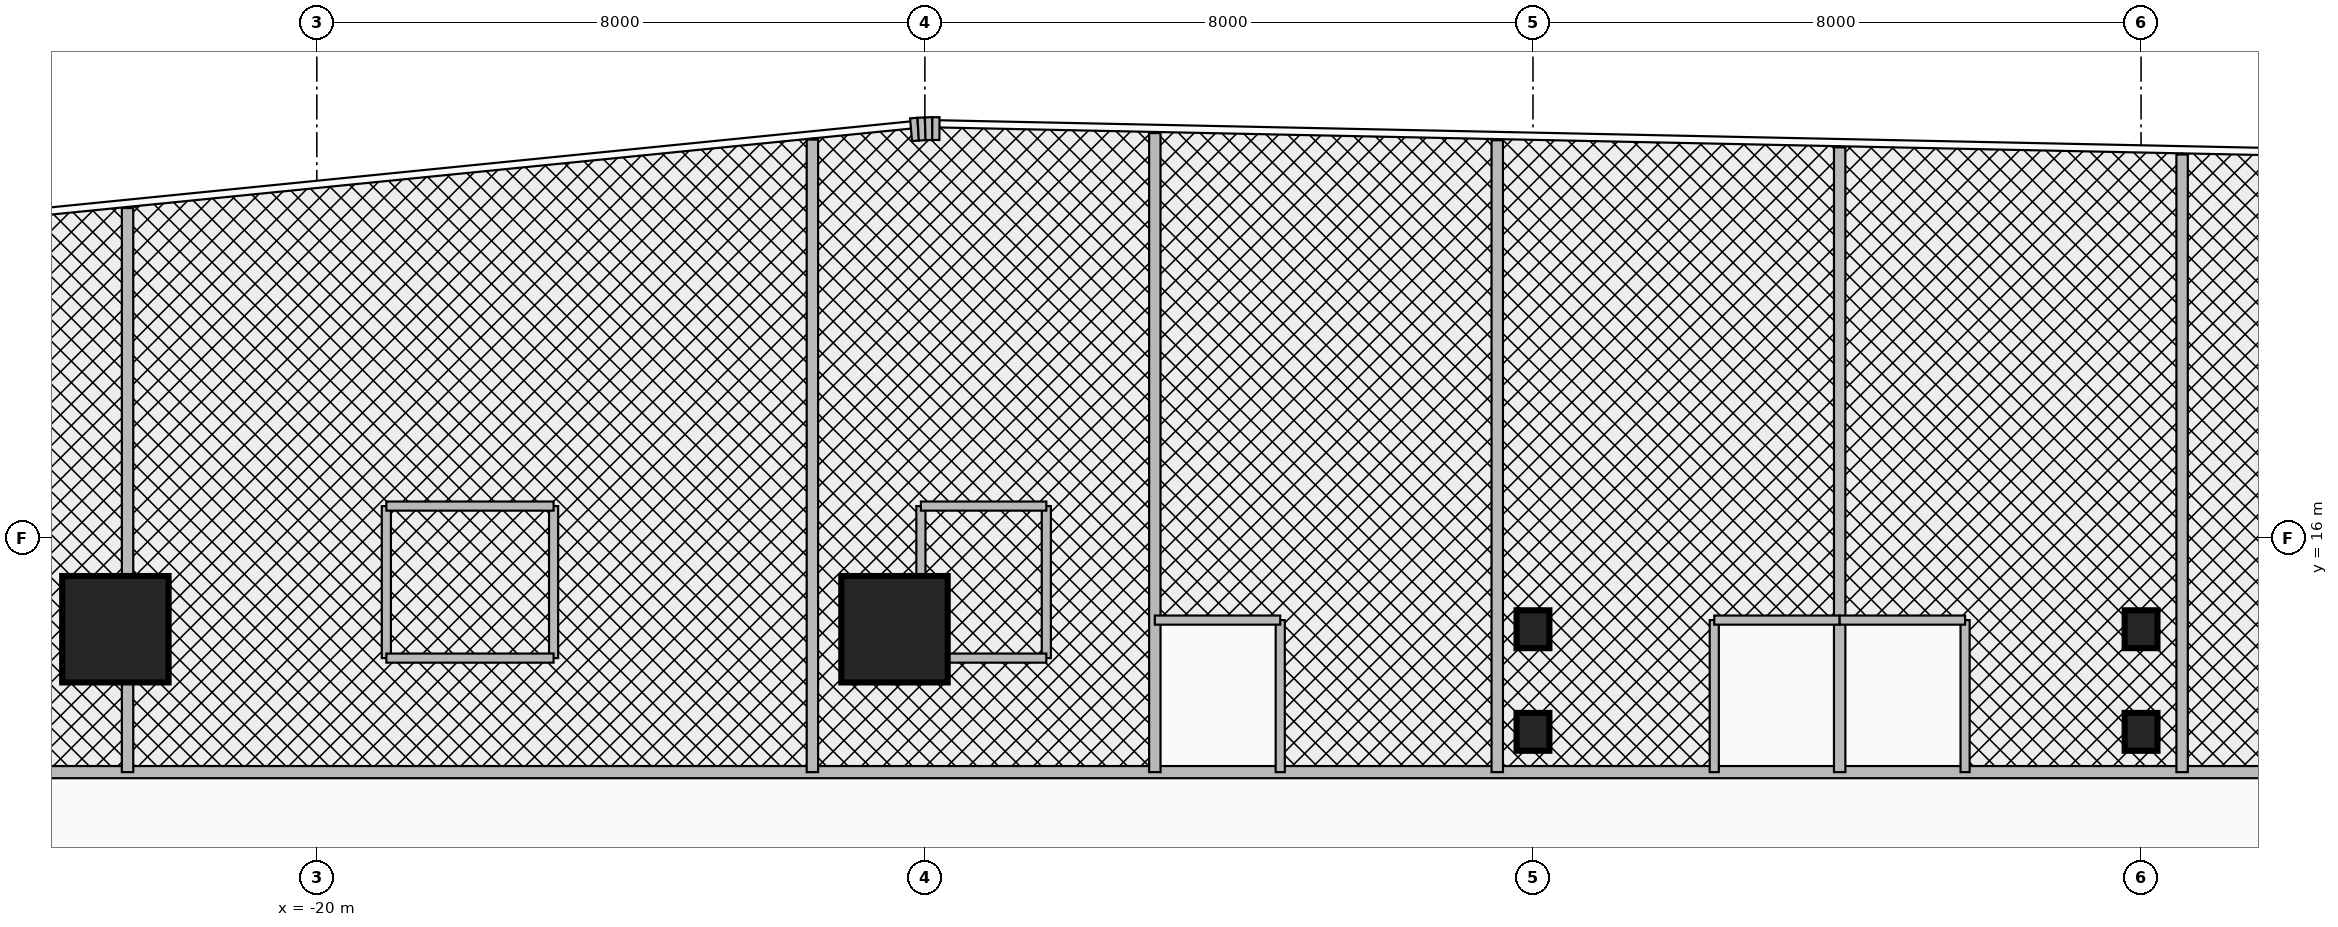
"""IFC4 building model, lengths in metres.
Left out: names, types, materials, properties, quantities, classifications, styles, units other than length and angle.
Written with IfcOpenShell. Run it as: python <this file> out.ifc"""

import sys

from ifc_helpers import new_model, si_unit, direction, frame, frame_2d, origin, origin_2d, place, context, subcontext, project, spatial, rectangle, i_section, extrude, source, transform, mapped, element, fill, save


model = new_model("IFC4")
c1 = context("Model", 3, precision=1e-05, world=origin(), true_north=direction((0.0, 1.0)))
c2 = subcontext(c1, "Body", "Model", "MODEL_VIEW")
j1 = project(units=[si_unit("LENGTHUNIT", "METRE"), si_unit("PLANEANGLEUNIT", "RADIAN")], contexts=[c1])
p1 = place(None, origin())
s1 = spatial("IfcSite", under=j1, at=p1, CompositionType="ELEMENT")
p2 = place(p1, origin())
s2 = spatial("IfcBuilding", under=s1, at=p2, CompositionType="ELEMENT")
p3 = place(p2, frame((0.0, 0.0, 26.0)))
s3 = spatial("IfcBuildingStorey", under=s2, at=p3, CompositionType="ELEMENT", Elevation=26.0)
m1 = source(origin(), c2, "Body", "SweptSolid", [
    extrude(rectangle(XDim=1.4, YDim=1.4, at=origin_2d()), origin(), (0.0, 0.0, 1.0), 3.7),
])
for number, where, z_axis, x_axis in (
    (1, (-22.65, 14.8, 0.0), (0.0, 0.0, 1.0), (1.0, 0.0, 0.0)),
    (2, (-12.4, 14.8, 0.0), (0.0, 0.0, 1.0), (1.0, 0.0, 0.0)),
):
    element("IfcColumn", number, at=place(p3, frame(where, z_axis=z_axis, x_axis=x_axis)), inside=s3, PredefinedType="COLUMN", context=c2, shape_type="MappedRepresentation", body=[
        mapped(m1, transform((0.0, 0.0, 0.0), x_axis=(1.0, 0.0, 0.0), y_axis=(0.0, 1.0, 0.0), z_axis=(0.0, 0.0, 1.0), scale=1.0)),
    ])
m2 = source(origin(), c2, "Body", "SweptSolid", [
    extrude(i_section(OverallWidth=0.432, OverallDepth=0.498, WebThickness=0.056, FlangeThickness=0.089, at=origin_2d()), origin(), (0.0, 0.0, 1.0), 3.7),
])
for number, where, z_axis, x_axis in (
    (3, (-4.0, 13.45, 0.0), (0.0, 0.0, 1.0), (1.0, 0.0, 0.0)),
    (4, (-4.0, 14.8, 0.0), (0.0, 0.0, 1.0), (1.0, 0.0, 0.0)),
    (5, (4.0, 13.45, 0.0), (0.0, 0.0, 1.0), (1.0, 0.0, 0.0)),
    (6, (4.0, 14.8, 0.0), (0.0, 0.0, 1.0), (1.0, 0.0, 0.0)),
):
    element("IfcColumn", number, at=place(p3, frame(where, z_axis=z_axis, x_axis=x_axis)), inside=s3, PredefinedType="COLUMN", context=c2, shape_type="MappedRepresentation", body=[
        mapped(m2, transform((0.0, 0.0, 0.0), x_axis=(1.0, 0.0, 0.0), y_axis=(0.0, 1.0, 0.0), z_axis=(0.0, 0.0, 1.0), scale=1.0)),
    ])
p4 = place(p3, frame((-12.182, 21.371, 0.0), z_axis=(0.0, 0.0, 1.0), x_axis=(0.996527790842, 0.08326080759, 0.0)))
e7 = element("IfcWall", 7, at=p4, inside=s3, PredefinedType="SOLIDWALL", context=c2, shape_type="SweptSolid", body=[
    extrude(rectangle(XDim=0.094, YDim=0.3, at=frame_2d((0.047, 0.0))), origin(), (0.0, 0.0, 1.0), 3.46),
])
p5 = place(p3, frame((-12.088, 21.379, 0.0), z_axis=(0.0, 0.0, 1.0), x_axis=(0.998476480444, 0.055178963393, 0.0)))
e8 = element("IfcWall", 8, at=p5, inside=s3, PredefinedType="SOLIDWALL", context=c2, shape_type="SweptSolid", body=[
    extrude(rectangle(XDim=0.093, YDim=0.3, at=frame_2d((0.046, 0.0))), origin(), (0.0, 0.0, 1.0), 3.46),
])
p6 = place(p3, frame((-11.996, 21.384, 0.0), z_axis=(0.0, 0.0, 1.0), x_axis=(0.999722573757, 0.023553673204, 0.0)))
e9 = element("IfcWall", 9, at=p6, inside=s3, PredefinedType="SOLIDWALL", context=c2, shape_type="SweptSolid", body=[
    extrude(rectangle(XDim=0.093, YDim=0.3, at=frame_2d((0.047, 0.0))), origin(), (0.0, 0.0, 1.0), 3.46),
])
p7 = place(p3, frame((-11.902, 21.386, 0.0), z_axis=(0.0, 0.0, 1.0), x_axis=(0.999986507273, -0.005194735103, 0.0)))
e10 = element("IfcWall", 10, at=p7, inside=s3, PredefinedType="SOLIDWALL", context=c2, shape_type="SweptSolid", body=[
    extrude(rectangle(XDim=0.094, YDim=0.3, at=frame_2d((0.047, 0.0))), origin(), (0.0, 0.0, 1.0), 3.46),
])
p8 = place(p3, frame((-31.89, 12.92, 0.0), z_axis=(0.0, 0.0, 1.0), x_axis=(1.0, 0.0, 0.0)))
e11 = element("IfcWall", 11, at=p8, inside=s3, PredefinedType="PARTITIONING", context=c2, shape_type="SweptSolid", body=[
    extrude(rectangle(XDim=45.44, YDim=0.16, at=frame_2d((22.72, 0.0))), origin(), (0.0, 0.0, 1.0), 2.583),
])
p9 = place(p8, frame((4.225, 0.0, 0.0)))
e12 = element("IfcOpeningElement", 12, at=p9, cuts=e11, PredefinedType="OPENING", context=c2, shape_type="SweptSolid", body=[
    extrude(rectangle(XDim=0.95, YDim=2.15, at=frame_2d((0.475, 1.075))), frame((0.0, 0.095, 0.0), z_axis=(0.0, -1.0, 0.0), x_axis=(1.0, 0.0, 0.0)), (0.0, 0.0, 1.0), 0.19),
])
p10 = place(p8, frame((13.43, 0.0, 0.0)))
e13 = element("IfcOpeningElement", 13, at=p10, cuts=e11, PredefinedType="OPENING", context=c2, shape_type="SweptSolid", body=[
    extrude(rectangle(XDim=0.95, YDim=2.15, at=frame_2d((0.475, 1.075))), frame((0.0, 0.095, 0.0), z_axis=(0.0, -1.0, 0.0), x_axis=(1.0, 0.0, 0.0)), (0.0, 0.0, 1.0), 0.19),
])
p11 = place(p8, frame((20.31, 0.0, 0.0)))
e14 = element("IfcOpeningElement", 14, at=p11, cuts=e11, PredefinedType="OPENING", context=c2, shape_type="SweptSolid", body=[
    extrude(rectangle(XDim=0.95, YDim=2.15, at=frame_2d((0.475, 1.075))), frame((0.0, 0.095, 0.0), z_axis=(0.0, -1.0, 0.0), x_axis=(1.0, 0.0, 0.0)), (0.0, 0.0, 1.0), 0.19),
])
p12 = place(p8, frame((25.517, 0.0, 0.0)))
e15 = element("IfcOpeningElement", 15, at=p12, cuts=e11, PredefinedType="OPENING", context=c2, shape_type="SweptSolid", body=[
    extrude(rectangle(XDim=0.95, YDim=2.15, at=frame_2d((0.475, 1.075))), frame((0.0, 0.095, 0.0), z_axis=(0.0, -1.0, 0.0), x_axis=(1.0, 0.0, 0.0)), (0.0, 0.0, 1.0), 0.19),
])
p13 = place(p8, frame((28.373, 0.0, 0.0)))
e16 = element("IfcOpeningElement", 16, at=p13, cuts=e11, PredefinedType="OPENING", context=c2, shape_type="SweptSolid", body=[
    extrude(rectangle(XDim=0.95, YDim=2.15, at=frame_2d((0.475, 1.075))), frame((0.0, 0.095, 0.0), z_axis=(0.0, -1.0, 0.0), x_axis=(1.0, 0.0, 0.0)), (0.0, 0.0, 1.0), 0.19),
])
p14 = place(p8, frame((34.527, 0.0, 0.0)))
e17 = element("IfcOpeningElement", 17, at=p14, cuts=e11, PredefinedType="OPENING", context=c2, shape_type="SweptSolid", body=[
    extrude(rectangle(XDim=0.95, YDim=2.15, at=frame_2d((0.475, 1.075))), frame((0.0, 0.095, 0.0), z_axis=(0.0, -1.0, 0.0), x_axis=(1.0, 0.0, 0.0)), (0.0, 0.0, 1.0), 0.19),
])
p15 = place(p8, frame((39.36, 0.0, 0.0)))
e18 = element("IfcOpeningElement", 18, at=p15, cuts=e11, PredefinedType="OPENING", context=c2, shape_type="SweptSolid", body=[
    extrude(rectangle(XDim=0.95, YDim=2.15, at=frame_2d((0.475, 1.075))), frame((0.0, 0.095, 0.0), z_axis=(0.0, -1.0, 0.0), x_axis=(1.0, 0.0, 0.0)), (0.0, 0.0, 1.0), 0.19),
])
p16 = place(p3, frame((-22.49, 12.92, 0.0), z_axis=(0.0, 0.0, 1.0), x_axis=(0.0, 1.0, 0.0)))
e19 = element("IfcWall", 19, at=p16, inside=s3, PredefinedType="PARTITIONING", context=c2, shape_type="SweptSolid", body=[
    extrude(rectangle(XDim=7.421, YDim=0.15, at=frame_2d((3.71, 0.0))), origin(), (0.0, 0.0, 1.0), 2.583),
])
p17 = place(p3, frame((-13.48, 12.92, 0.0), z_axis=(0.0, 0.0, 1.0), x_axis=(0.0, 1.0, 0.0)))
e20 = element("IfcWall", 20, at=p17, inside=s3, PredefinedType="PARTITIONING", context=c2, shape_type="SweptSolid", body=[
    extrude(rectangle(XDim=8.322, YDim=0.15, at=frame_2d((4.161, 0.0))), origin(), (0.0, 0.0, 1.0), 2.583),
])
p18 = place(p3, frame((-4.47, 12.92, 0.0), z_axis=(0.0, 0.0, 1.0), x_axis=(0.0, 1.0, 0.0)))
e21 = element("IfcWall", 21, at=p18, inside=s3, PredefinedType="PARTITIONING", context=c2, shape_type="SweptSolid", body=[
    extrude(rectangle(XDim=8.313, YDim=0.15, at=frame_2d((4.157, 0.0))), origin(), (0.0, 0.0, 1.0), 2.583),
])
p19 = place(p3, frame((4.54, 12.92, 0.0), z_axis=(0.0, 0.0, 1.0), x_axis=(0.0, 1.0, 0.0)))
e22 = element("IfcWall", 22, at=p19, inside=s3, PredefinedType="PARTITIONING", context=c2, shape_type="SweptSolid", body=[
    extrude(rectangle(XDim=8.125, YDim=0.15, at=frame_2d((4.063, 0.0))), origin(), (0.0, 0.0, 1.0), 2.583),
])
for number, where, z_axis, x_axis in (
    (23, (-19.085, 14.42, 0.0), (0.0, 0.0, 1.0), (0.0, 1.0, 0.0)),
    (24, (-16.885, 14.42, 0.0), (0.0, 0.0, 1.0), (0.0, 1.0, 0.0)),
):
    element("IfcWall", number, at=place(p3, frame(where, z_axis=z_axis, x_axis=x_axis)), inside=s3, PredefinedType="PARTITIONING", context=c2, shape_type="SweptSolid", body=[
        extrude(rectangle(XDim=2.0, YDim=0.12, at=frame_2d((1.0, 0.0))), origin(), (0.0, 0.0, 1.0), 2.583),
    ])
p20 = place(p3, frame((-19.085, 16.42, 0.0), z_axis=(0.0, 0.0, 1.0), x_axis=(1.0, 0.0, 0.0)))
e25 = element("IfcWall", 25, at=p20, inside=s3, PredefinedType="PARTITIONING", context=c2, shape_type="SweptSolid", body=[
    extrude(rectangle(XDim=2.2, YDim=0.12, at=frame_2d((1.1, 0.0))), origin(), (0.0, 0.0, 1.0), 3.46),
])
p21 = place(p3, frame((-19.085, 14.42, 0.0), z_axis=(0.0, 0.0, 1.0), x_axis=(1.0, 0.0, 0.0)))
e26 = element("IfcWall", 26, at=p21, inside=s3, PredefinedType="PARTITIONING", context=c2, shape_type="SweptSolid", body=[
    extrude(rectangle(XDim=2.2, YDim=0.12, at=frame_2d((1.1, 0.0))), origin(), (0.0, 0.0, 1.0), 3.46),
])
p22 = place(p21, frame((0.675, 0.0, 0.0)))
e27 = element("IfcOpeningElement", 27, at=p22, cuts=e26, PredefinedType="OPENING", context=c2, shape_type="SweptSolid", body=[
    extrude(rectangle(XDim=0.85, YDim=2.1, at=frame_2d((0.425, 1.05))), frame((0.0, 0.075, 0.0), z_axis=(0.0, -1.0, 0.0), x_axis=(1.0, 0.0, 0.0)), (0.0, 0.0, 1.0), 0.15),
])
p23 = place(p3, frame((-8.975, 12.92, 0.0), z_axis=(0.0, 0.0, 1.0), x_axis=(0.0, 1.0, 0.0)))
e28 = element("IfcWall", 28, at=p23, inside=s3, PredefinedType="PARTITIONING", context=c2, shape_type="SweptSolid", body=[
    extrude(rectangle(XDim=8.407, YDim=0.15, at=frame_2d((4.204, 0.0))), origin(), (0.0, 0.0, 1.0), 2.583),
])
for number, where, z_axis, x_axis in (
    (29, (-12.052, 14.42, 0.0), (0.0, 0.0, 1.0), (0.0, 1.0, 0.0)),
    (30, (-10.403, 14.42, 0.0), (0.0, 0.0, 1.0), (0.0, 1.0, 0.0)),
):
    element("IfcWall", number, at=place(p3, frame(where, z_axis=z_axis, x_axis=x_axis)), inside=s3, PredefinedType="PARTITIONING", context=c2, shape_type="SweptSolid", body=[
        extrude(rectangle(XDim=2.0, YDim=0.12, at=frame_2d((1.0, 0.0))), origin(), (0.0, 0.0, 1.0), 2.583),
    ])
p24 = place(p3, frame((-12.052, 16.42, 0.0), z_axis=(0.0, 0.0, 1.0), x_axis=(1.0, 0.0, 0.0)))
e31 = element("IfcWall", 31, at=p24, inside=s3, PredefinedType="PARTITIONING", context=c2, shape_type="SweptSolid", body=[
    extrude(rectangle(XDim=1.65, YDim=0.12, at=frame_2d((0.825, 0.0))), origin(), (0.0, 0.0, 1.0), 3.46),
])
p25 = place(p3, frame((-12.052, 14.42, 0.0), z_axis=(0.0, 0.0, 1.0), x_axis=(1.0, 0.0, 0.0)))
e32 = element("IfcWall", 32, at=p25, inside=s3, PredefinedType="PARTITIONING", context=c2, shape_type="SweptSolid", body=[
    extrude(rectangle(XDim=1.65, YDim=0.12, at=frame_2d((0.825, 0.0))), origin(), (0.0, 0.0, 1.0), 3.46),
])
p26 = place(p25, frame((0.46, 0.0, 0.0)))
e33 = element("IfcOpeningElement", 33, at=p26, cuts=e32, PredefinedType="OPENING", context=c2, shape_type="SweptSolid", body=[
    extrude(rectangle(XDim=0.85, YDim=2.1, at=frame_2d((0.425, 1.05))), frame((0.0, 0.075, 0.0), z_axis=(0.0, -1.0, 0.0), x_axis=(1.0, 0.0, 0.0)), (0.0, 0.0, 1.0), 0.15),
])
p27 = place(p3, frame((-7.325, 12.92, 0.0), z_axis=(0.0, 0.0, 1.0), x_axis=(0.0, 1.0, 0.0)))
e34 = element("IfcWall", 34, at=p27, inside=s3, PredefinedType="PARTITIONING", context=c2, shape_type="SweptSolid", body=[
    extrude(rectangle(XDim=2.0, YDim=0.12, at=frame_2d((1.0, 0.0))), origin(), (0.0, 0.0, 1.0), 2.583),
])
p28 = place(p3, frame((-8.975, 14.92, 0.0), z_axis=(0.0, 0.0, 1.0), x_axis=(1.0, 0.0, 0.0)))
e35 = element("IfcWall", 35, at=p28, inside=s3, PredefinedType="PARTITIONING", context=c2, shape_type="SweptSolid", body=[
    extrude(rectangle(XDim=1.65, YDim=0.12, at=frame_2d((0.825, 0.0))), origin(), (0.0, 0.0, 1.0), 2.583),
])
p29 = place(p28, frame((0.4, 0.0, 0.0)))
e36 = element("IfcOpeningElement", 36, at=p29, cuts=e35, PredefinedType="OPENING", context=c2, shape_type="SweptSolid", body=[
    extrude(rectangle(XDim=0.85, YDim=2.1, at=frame_2d((0.425, 1.05))), frame((0.0, 0.075, 0.0), z_axis=(0.0, -1.0, 0.0), x_axis=(1.0, 0.0, 0.0)), (0.0, 0.0, 1.0), 0.15),
])
p30 = place(p3, frame((0.035, 12.92, 0.0), z_axis=(0.0, 0.0, 1.0), x_axis=(0.0, 1.0, 0.0)))
e37 = element("IfcWall", 37, at=p30, inside=s3, PredefinedType="PARTITIONING", context=c2, shape_type="SweptSolid", body=[
    extrude(rectangle(XDim=8.219, YDim=0.15, at=frame_2d((4.11, 0.0))), origin(), (0.0, 0.0, 1.0), 2.583),
])
p31 = place(p3, frame((-1.615, 12.92, 0.0), z_axis=(0.0, 0.0, 1.0), x_axis=(0.0, 1.0, 0.0)))
e38 = element("IfcWall", 38, at=p31, inside=s3, PredefinedType="PARTITIONING", context=c2, shape_type="SweptSolid", body=[
    extrude(rectangle(XDim=2.0, YDim=0.12, at=frame_2d((1.0, 0.0))), origin(), (0.0, 0.0, 1.0), 2.583),
])
p32 = place(p3, frame((-1.615, 14.92, 0.0), z_axis=(0.0, 0.0, 1.0), x_axis=(1.0, 0.0, 0.0)))
e39 = element("IfcWall", 39, at=p32, inside=s3, PredefinedType="PARTITIONING", context=c2, shape_type="SweptSolid", body=[
    extrude(rectangle(XDim=1.65, YDim=0.12, at=frame_2d((0.825, 0.0))), origin(), (0.0, 0.0, 1.0), 2.583),
])
p33 = place(p32, frame((0.4, 0.0, 0.0)))
e40 = element("IfcOpeningElement", 40, at=p33, cuts=e39, PredefinedType="OPENING", context=c2, shape_type="SweptSolid", body=[
    extrude(rectangle(XDim=0.85, YDim=2.1, at=frame_2d((0.425, 1.05))), frame((0.0, 0.075, 0.0), z_axis=(0.0, -1.0, 0.0), x_axis=(1.0, 0.0, 0.0)), (0.0, 0.0, 1.0), 0.15),
])
p34 = place(p3, frame((1.685, 12.92, 0.0), z_axis=(0.0, 0.0, 1.0), x_axis=(0.0, 1.0, 0.0)))
e41 = element("IfcWall", 41, at=p34, inside=s3, PredefinedType="PARTITIONING", context=c2, shape_type="SweptSolid", body=[
    extrude(rectangle(XDim=2.0, YDim=0.12, at=frame_2d((1.0, 0.0))), origin(), (0.0, 0.0, 1.0), 2.583),
])
p35 = place(p3, frame((0.035, 14.92, 0.0), z_axis=(0.0, 0.0, 1.0), x_axis=(1.0, 0.0, 0.0)))
e42 = element("IfcWall", 42, at=p35, inside=s3, PredefinedType="PARTITIONING", context=c2, shape_type="SweptSolid", body=[
    extrude(rectangle(XDim=1.65, YDim=0.12, at=frame_2d((0.825, 0.0))), origin(), (0.0, 0.0, 1.0), 2.583),
])
p36 = place(p35, frame((0.4, 0.0, 0.0)))
e43 = element("IfcOpeningElement", 43, at=p36, cuts=e42, PredefinedType="OPENING", context=c2, shape_type="SweptSolid", body=[
    extrude(rectangle(XDim=0.85, YDim=2.1, at=frame_2d((0.425, 1.05))), frame((0.0, 0.075, 0.0), z_axis=(0.0, -1.0, 0.0), x_axis=(1.0, 0.0, 0.0)), (0.0, 0.0, 1.0), 0.15),
])
p37 = place(p10, frame((0.95, 0.0, 0.0), z_axis=(0.0, 0.0, 1.0), x_axis=(-1.0, 0.0, 0.0)))
e44 = element("IfcDoor", 44, at=p37, inside=s3, OperationType="SINGLE_SWING_LEFT", PredefinedType="DOOR", context=c2, shape_type="SweptSolid", body=[
    extrude(rectangle(XDim=0.95, YDim=2.15, at=frame_2d((0.475, 1.075))), frame((0.0, 0.025, 0.0), z_axis=(0.0, -1.0, 0.0), x_axis=(1.0, 0.0, 0.0)), (0.0, 0.0, 1.0), 0.05),
])
fill(e13, e44)
p38 = place(p22, origin())
e45 = element("IfcDoor", 45, at=p38, inside=s3, OperationType="SINGLE_SWING_RIGHT", PredefinedType="DOOR", context=c2, shape_type="SweptSolid", body=[
    extrude(rectangle(XDim=0.85, YDim=2.1, at=frame_2d((0.425, 1.05))), frame((0.0, 0.025, 0.0), z_axis=(0.0, -1.0, 0.0), x_axis=(1.0, 0.0, 0.0)), (0.0, 0.0, 1.0), 0.05),
])
fill(e27, e45)
p39 = place(p11, frame((0.95, 0.0, 0.0), z_axis=(0.0, 0.0, 1.0), x_axis=(-1.0, 0.0, 0.0)))
e46 = element("IfcDoor", 46, at=p39, inside=s3, OperationType="SINGLE_SWING_LEFT", PredefinedType="DOOR", context=c2, shape_type="SweptSolid", body=[
    extrude(rectangle(XDim=0.95, YDim=2.15, at=frame_2d((0.475, 1.075))), frame((0.0, 0.025, 0.0), z_axis=(0.0, -1.0, 0.0), x_axis=(1.0, 0.0, 0.0)), (0.0, 0.0, 1.0), 0.05),
])
fill(e14, e46)
p40 = place(p26, origin())
e47 = element("IfcDoor", 47, at=p40, inside=s3, OperationType="SINGLE_SWING_RIGHT", PredefinedType="DOOR", context=c2, shape_type="SweptSolid", body=[
    extrude(rectangle(XDim=0.85, YDim=2.1, at=frame_2d((0.425, 1.05))), frame((0.0, 0.025, 0.0), z_axis=(0.0, -1.0, 0.0), x_axis=(1.0, 0.0, 0.0)), (0.0, 0.0, 1.0), 0.05),
])
fill(e33, e47)
p41 = place(p12, frame((0.95, 0.0, 0.0), z_axis=(0.0, 0.0, 1.0), x_axis=(-1.0, 0.0, 0.0)))
e48 = element("IfcDoor", 48, at=p41, inside=s3, OperationType="SINGLE_SWING_LEFT", PredefinedType="DOOR", context=c2, shape_type="SweptSolid", body=[
    extrude(rectangle(XDim=0.95, YDim=2.15, at=frame_2d((0.475, 1.075))), frame((0.0, 0.025, 0.0), z_axis=(0.0, -1.0, 0.0), x_axis=(1.0, 0.0, 0.0)), (0.0, 0.0, 1.0), 0.05),
])
fill(e15, e48)
p42 = place(p29, origin())
e49 = element("IfcDoor", 49, at=p42, inside=s3, OperationType="SINGLE_SWING_RIGHT", PredefinedType="DOOR", context=c2, shape_type="SweptSolid", body=[
    extrude(rectangle(XDim=0.85, YDim=2.1, at=frame_2d((0.425, 1.05))), frame((0.0, 0.025, 0.0), z_axis=(0.0, -1.0, 0.0), x_axis=(1.0, 0.0, 0.0)), (0.0, 0.0, 1.0), 0.05),
])
fill(e36, e49)
p43 = place(p13, frame((0.95, 0.0, 0.0), z_axis=(0.0, 0.0, 1.0), x_axis=(-1.0, 0.0, 0.0)))
e50 = element("IfcDoor", 50, at=p43, inside=s3, OperationType="SINGLE_SWING_LEFT", PredefinedType="DOOR", context=c2, shape_type="SweptSolid", body=[
    extrude(rectangle(XDim=0.95, YDim=2.15, at=frame_2d((0.475, 1.075))), frame((0.0, 0.025, 0.0), z_axis=(0.0, -1.0, 0.0), x_axis=(1.0, 0.0, 0.0)), (0.0, 0.0, 1.0), 0.05),
])
fill(e16, e50)
p44 = place(p33, origin())
e51 = element("IfcDoor", 51, at=p44, inside=s3, OperationType="SINGLE_SWING_RIGHT", PredefinedType="DOOR", context=c2, shape_type="SweptSolid", body=[
    extrude(rectangle(XDim=0.85, YDim=2.1, at=frame_2d((0.425, 1.05))), frame((0.0, 0.025, 0.0), z_axis=(0.0, -1.0, 0.0), x_axis=(1.0, 0.0, 0.0)), (0.0, 0.0, 1.0), 0.05),
])
fill(e40, e51)
p45 = place(p14, frame((0.95, 0.0, 0.0), z_axis=(0.0, 0.0, 1.0), x_axis=(-1.0, 0.0, 0.0)))
e52 = element("IfcDoor", 52, at=p45, inside=s3, OperationType="SINGLE_SWING_LEFT", PredefinedType="DOOR", context=c2, shape_type="SweptSolid", body=[
    extrude(rectangle(XDim=0.95, YDim=2.15, at=frame_2d((0.475, 1.075))), frame((0.0, 0.025, 0.0), z_axis=(0.0, -1.0, 0.0), x_axis=(1.0, 0.0, 0.0)), (0.0, 0.0, 1.0), 0.05),
])
fill(e17, e52)
p46 = place(p36, origin())
e53 = element("IfcDoor", 53, at=p46, inside=s3, OperationType="SINGLE_SWING_RIGHT", PredefinedType="DOOR", context=c2, shape_type="SweptSolid", body=[
    extrude(rectangle(XDim=0.85, YDim=2.1, at=frame_2d((0.425, 1.05))), frame((0.0, 0.025, 0.0), z_axis=(0.0, -1.0, 0.0), x_axis=(1.0, 0.0, 0.0)), (0.0, 0.0, 1.0), 0.05),
])
fill(e43, e53)
save(model, sys.argv[1])
